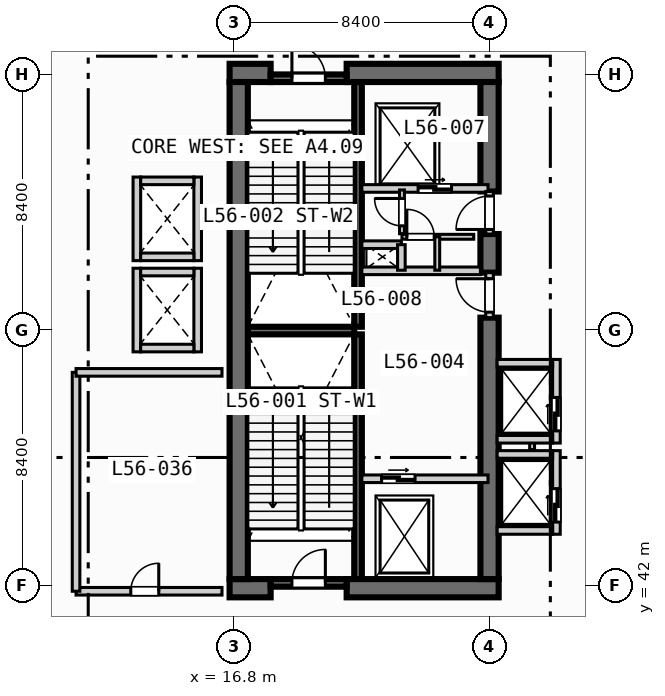
"""IFC4 building model, lengths in metres.
Left out: names, types, materials, properties, quantities, classifications, styles, units other than length and angle.
Written with IfcOpenShell. Run it as: python <this file> out.ifc"""

import sys

from ifc_helpers import new_model, si_unit, direction, frame, frame_2d, origin, place, context, subcontext, project, spatial, rectangle, extrude, element, fill, save


model = new_model("IFC4")
c1 = context("Model", 3, precision=1e-05, world=origin(), true_north=direction((0.0, 1.0)))
c2 = subcontext(c1, "Body", "Model", "MODEL_VIEW")
j1 = project(units=[si_unit("LENGTHUNIT", "METRE"), si_unit("PLANEANGLEUNIT", "RADIAN")], contexts=[c1])
p1 = place(None, origin())
s1 = spatial("IfcSite", under=j1, at=p1, CompositionType="ELEMENT")
p2 = place(p1, origin())
s2 = spatial("IfcBuilding", under=s1, at=p2, CompositionType="ELEMENT")
p3 = place(p2, frame((0.0, 0.0, 228.2)))
s3 = spatial("IfcBuildingStorey", under=s2, at=p3, CompositionType="ELEMENT", Elevation=228.2)
for number, where, z_axis, x_axis in (
    (1, (20.875, 42.2, 0.0), (0.0, 0.0, 1.0), (0.0, 1.0, 0.0)),
    (2, (20.875, 50.5, 0.0), (0.0, 0.0, 1.0), (0.0, 1.0, 0.0)),
):
    element("IfcWall", number, at=place(p3, frame(where, z_axis=z_axis, x_axis=x_axis)), inside=s3, PredefinedType="SOLIDWALL", context=c2, shape_type="SweptSolid", body=[
        extrude(rectangle(XDim=8.05, YDim=0.25, at=frame_2d((4.025, 0.0))), origin(), (0.0, 0.0, 1.0), 5.77),
    ])
p4 = place(p3, frame((17.25, 50.375, 0.0), z_axis=(0.0, 0.0, 1.0), x_axis=(1.0, 0.0, 0.0)))
e3 = element("IfcWall", 3, at=p4, inside=s3, PredefinedType="SOLIDWALL", context=c2, shape_type="SweptSolid", body=[
    extrude(rectangle(XDim=3.5, YDim=0.25, at=frame_2d((1.75, 0.0))), origin(), (0.0, 0.0, 1.0), 5.77),
])
p5 = place(p3, frame((16.65, 41.9, 0.0), z_axis=(0.0, 0.0, 1.0), x_axis=(1.0, 0.0, 0.0)))
e4 = element("IfcWall", 4, at=p5, inside=s3, PredefinedType="SHEAR", context=c2, shape_type="SweptSolid", body=[
    extrude(rectangle(XDim=1.35, YDim=0.6, at=frame_2d((0.675, 0.0))), origin(), (0.0, 0.0, 1.0), 5.77),
])
p6 = place(p3, frame((20.5, 41.9, 0.0), z_axis=(0.0, 0.0, 1.0), x_axis=(1.0, 0.0, 0.0)))
e5 = element("IfcWall", 5, at=p6, inside=s3, PredefinedType="SHEAR", context=c2, shape_type="SweptSolid", body=[
    extrude(rectangle(XDim=5.0, YDim=0.6, at=frame_2d((2.5, 0.0))), origin(), (0.0, 0.0, 1.0), 5.77),
])
p7 = place(p3, frame((16.65, 58.85, 0.0), z_axis=(0.0, 0.0, 1.0), x_axis=(1.0, 0.0, 0.0)))
e6 = element("IfcWall", 6, at=p7, inside=s3, PredefinedType="SHEAR", context=c2, shape_type="SweptSolid", body=[
    extrude(rectangle(XDim=1.35, YDim=0.6, at=frame_2d((0.675, 0.0))), origin(), (0.0, 0.0, 1.0), 5.77),
])
p8 = place(p3, frame((20.5, 58.85, 0.0), z_axis=(0.0, 0.0, 1.0), x_axis=(1.0, 0.0, 0.0)))
e7 = element("IfcWall", 7, at=p8, inside=s3, PredefinedType="SHEAR", context=c2, shape_type="SweptSolid", body=[
    extrude(rectangle(XDim=5.0, YDim=0.6, at=frame_2d((2.5, 0.0))), origin(), (0.0, 0.0, 1.0), 5.77),
])
p9 = place(p3, frame((16.95, 42.2, 0.0), z_axis=(0.0, 0.0, 1.0), x_axis=(0.0, 1.0, 0.0)))
e8 = element("IfcWall", 8, at=p9, inside=s3, PredefinedType="SHEAR", context=c2, shape_type="SweptSolid", body=[
    extrude(rectangle(XDim=16.35, YDim=0.6, at=frame_2d((8.175, 0.0))), origin(), (0.0, 0.0, 1.0), 5.77),
])
p10 = place(p3, frame((25.2, 42.2, 0.0), z_axis=(0.0, 0.0, 1.0), x_axis=(0.0, 1.0, 0.0)))
e9 = element("IfcWall", 9, at=p10, inside=s3, PredefinedType="SHEAR", context=c2, shape_type="SweptSolid", body=[
    extrude(rectangle(XDim=8.6, YDim=0.6, at=frame_2d((4.3, 0.0))), origin(), (0.0, 0.0, 1.0), 5.77),
])
p11 = place(p3, frame((25.2, 52.28, 0.0), z_axis=(0.0, 0.0, 1.0), x_axis=(0.0, 1.0, 0.0)))
e10 = element("IfcWall", 10, at=p11, inside=s3, PredefinedType="SHEAR", context=c2, shape_type="SweptSolid", body=[
    extrude(rectangle(XDim=1.27, YDim=0.6, at=frame_2d((0.635, 0.0))), origin(), (0.0, 0.0, 1.0), 5.77),
])
p12 = place(p3, frame((25.2, 54.95, 0.0), z_axis=(0.0, 0.0, 1.0), x_axis=(0.0, 1.0, 0.0)))
e11 = element("IfcWall", 11, at=p12, inside=s3, PredefinedType="SHEAR", context=c2, shape_type="SweptSolid", body=[
    extrude(rectangle(XDim=3.6, YDim=0.6, at=frame_2d((1.8, 0.0))), origin(), (0.0, 0.0, 1.0), 5.77),
])
p13 = place(p3, frame((18.0, 42.075, 0.0), z_axis=(0.0, 0.0, 1.0), x_axis=(1.0, 0.0, 0.0)))
e12 = element("IfcWall", 12, at=p13, inside=s3, PredefinedType="SOLIDWALL", context=c2, shape_type="SweptSolid", body=[
    extrude(rectangle(XDim=2.5, YDim=0.25, at=frame_2d((1.25, 0.0))), origin(), (0.0, 0.0, 1.0), 5.77),
])
p14 = place(p13, frame((0.7, 0.0, 0.0)))
e13 = element("IfcOpeningElement", 13, at=p14, cuts=e12, PredefinedType="OPENING", context=c2, shape_type="SweptSolid", body=[
    extrude(rectangle(XDim=1.1, YDim=2.15, at=frame_2d((0.55, 1.075))), frame((0.0, 0.135, 0.0), z_axis=(0.0, -1.0, 0.0), x_axis=(1.0, 0.0, 0.0)), (0.0, 0.0, 1.0), 0.27),
])
p15 = place(p3, frame((18.0, 58.675, 0.0), z_axis=(0.0, 0.0, 1.0), x_axis=(1.0, 0.0, 0.0)))
e14 = element("IfcWall", 14, at=p15, inside=s3, PredefinedType="SOLIDWALL", context=c2, shape_type="SweptSolid", body=[
    extrude(rectangle(XDim=2.5, YDim=0.25, at=frame_2d((1.25, 0.0))), origin(), (0.0, 0.0, 1.0), 5.77),
])
p16 = place(p15, frame((0.7, 0.0, 0.0)))
e15 = element("IfcOpeningElement", 15, at=p16, cuts=e14, PredefinedType="OPENING", context=c2, shape_type="SweptSolid", body=[
    extrude(rectangle(XDim=1.1, YDim=2.15, at=frame_2d((0.55, 1.075))), frame((0.0, 0.135, 0.0), z_axis=(0.0, -1.0, 0.0), x_axis=(1.0, 0.0, 0.0)), (0.0, 0.0, 1.0), 0.27),
])
p17 = place(p3, frame((21.0, 45.5, 0.0), z_axis=(0.0, 0.0, 1.0), x_axis=(1.0, 0.0, 0.0)))
e16 = element("IfcWall", 16, at=p17, inside=s3, PredefinedType="SOLIDWALL", context=c2, shape_type="SweptSolid", body=[
    extrude(rectangle(XDim=4.15, YDim=0.25, at=frame_2d((2.075, 0.0))), origin(), (0.0, 0.0, 1.0), 5.77),
])
p18 = place(p17, frame((0.65, 0.0, 0.0)))
e17 = element("IfcOpeningElement", 17, at=p18, cuts=e16, PredefinedType="OPENING", context=c2, shape_type="SweptSolid", body=[
    extrude(rectangle(XDim=1.1, YDim=2.15, at=frame_2d((0.55, 1.075))), frame((0.0, 0.135, 0.0), z_axis=(0.0, -1.0, 0.0), x_axis=(1.0, 0.0, 0.0)), (0.0, 0.0, 1.0), 0.27),
])
p19 = place(p3, frame((25.2, 50.8, 0.0), z_axis=(0.0, 0.0, 1.0), x_axis=(0.0, 1.0, 0.0)))
e18 = element("IfcWall", 18, at=p19, inside=s3, PredefinedType="SOLIDWALL", context=c2, shape_type="SweptSolid", body=[
    extrude(rectangle(XDim=1.48, YDim=0.25, at=frame_2d((0.74, 0.0))), origin(), (0.0, 0.0, 1.0), 5.77),
])
p20 = place(p19, frame((0.18, 0.0, 0.0)))
e19 = element("IfcOpeningElement", 19, at=p20, cuts=e18, PredefinedType="OPENING", context=c2, shape_type="SweptSolid", body=[
    extrude(rectangle(XDim=1.1, YDim=2.15, at=frame_2d((0.55, 1.075))), frame((0.0, 0.135, 0.0), z_axis=(0.0, -1.0, 0.0), x_axis=(1.0, 0.0, 0.0)), (0.0, 0.0, 1.0), 0.27),
])
p21 = place(p3, frame((21.0, 52.34, 0.0), z_axis=(0.0, 0.0, 1.0), x_axis=(1.0, 0.0, 0.0)))
e20 = element("IfcWall", 20, at=p21, inside=s3, PredefinedType="SOLIDWALL", context=c2, shape_type="SweptSolid", body=[
    extrude(rectangle(XDim=3.9, YDim=0.25, at=frame_2d((1.95, 0.0))), origin(), (0.0, 0.0, 1.0), 5.77),
])
p22 = place(p3, frame((21.0, 55.05, 0.0), z_axis=(0.0, 0.0, 1.0), x_axis=(1.0, 0.0, 0.0)))
e21 = element("IfcWall", 21, at=p22, inside=s3, PredefinedType="SOLIDWALL", context=c2, shape_type="SweptSolid", body=[
    extrude(rectangle(XDim=4.15, YDim=0.25, at=frame_2d((2.075, 0.0))), origin(), (0.0, 0.0, 1.0), 5.77),
])
p23 = place(p22, frame((1.85, 0.0, 0.0)))
e22 = element("IfcOpeningElement", 22, at=p23, cuts=e21, PredefinedType="OPENING", context=c2, shape_type="SweptSolid", body=[
    extrude(rectangle(XDim=1.1, YDim=2.15, at=frame_2d((0.55, 1.075))), frame((0.0, 0.135, 0.0), z_axis=(0.0, -1.0, 0.0), x_axis=(1.0, 0.0, 0.0)), (0.0, 0.0, 1.0), 0.27),
])
p24 = place(p3, frame((25.2, 53.55, 0.0), z_axis=(0.0, 0.0, 1.0), x_axis=(0.0, 1.0, 0.0)))
e23 = element("IfcWall", 23, at=p24, inside=s3, PredefinedType="SOLIDWALL", context=c2, shape_type="SweptSolid", body=[
    extrude(rectangle(XDim=1.4, YDim=0.25, at=frame_2d((0.7, 0.0))), origin(), (0.0, 0.0, 1.0), 5.77),
])
p25 = place(p24, frame((0.15, 0.0, 0.0)))
e24 = element("IfcOpeningElement", 24, at=p25, cuts=e23, PredefinedType="OPENING", context=c2, shape_type="SweptSolid", body=[
    extrude(rectangle(XDim=1.1, YDim=2.15, at=frame_2d((0.55, 1.075))), frame((0.0, 0.135, 0.0), z_axis=(0.0, -1.0, 0.0), x_axis=(1.0, 0.0, 0.0)), (0.0, 0.0, 1.0), 0.27),
])
p26 = place(p3, frame((21.0, 53.2, 0.0), z_axis=(0.0, 0.0, 1.0), x_axis=(1.0, 0.0, 0.0)))
e25 = element("IfcWall", 25, at=p26, inside=s3, PredefinedType="SOLIDWALL", context=c2, shape_type="SweptSolid", body=[
    extrude(rectangle(XDim=1.3, YDim=0.25, at=frame_2d((0.65, 0.0))), origin(), (0.0, 0.0, 1.0), 5.77),
])
p27 = place(p3, frame((22.3, 52.36, 0.0), z_axis=(0.0, 0.0, 1.0), x_axis=(0.0, 1.0, 0.0)))
e26 = element("IfcWall", 26, at=p27, inside=s3, PredefinedType="SOLIDWALL", context=c2, shape_type="SweptSolid", body=[
    extrude(rectangle(XDim=0.84, YDim=0.25, at=frame_2d((0.42, 0.0))), origin(), (0.0, 0.0, 1.0), 5.77),
])
p28 = place(p3, frame((22.32, 53.56, 0.0), z_axis=(0.0, 0.0, 1.0), x_axis=(0.0, 1.0, 0.0)))
e27 = element("IfcWall", 27, at=p28, inside=s3, PredefinedType="PARTITIONING", context=c2, shape_type="SweptSolid", body=[
    extrude(rectangle(XDim=1.44, YDim=0.16, at=frame_2d((0.72, 0.0))), origin(), (0.0, 0.0, 1.0), 5.77),
])
p29 = place(p28, frame((0.26, 0.0, 0.0)))
e28 = element("IfcOpeningElement", 28, at=p29, cuts=e27, PredefinedType="OPENING", context=c2, shape_type="SweptSolid", body=[
    extrude(rectangle(XDim=0.9, YDim=2.1, at=frame_2d((0.45, 1.05))), frame((0.0, 0.09, 0.0), z_axis=(0.0, -1.0, 0.0), x_axis=(1.0, 0.0, 0.0)), (0.0, 0.0, 1.0), 0.18),
])
p30 = place(p3, frame((22.32, 53.46, 0.0), z_axis=(0.0, 0.0, 1.0), x_axis=(1.0, 0.0, 0.0)))
e29 = element("IfcWall", 29, at=p30, inside=s3, PredefinedType="PARTITIONING", context=c2, shape_type="SweptSolid", body=[
    extrude(rectangle(XDim=2.36, YDim=0.16, at=frame_2d((1.18, 0.0))), origin(), (0.0, 0.0, 1.0), 5.77),
])
p31 = place(p30, frame((0.16, 0.0, 0.0)))
e30 = element("IfcOpeningElement", 30, at=p31, cuts=e29, PredefinedType="OPENING", context=c2, shape_type="SweptSolid", body=[
    extrude(rectangle(XDim=0.9, YDim=2.1, at=frame_2d((0.45, 1.05))), frame((0.0, 0.09, 0.0), z_axis=(0.0, -1.0, 0.0), x_axis=(1.0, 0.0, 0.0)), (0.0, 0.0, 1.0), 0.18),
])
p32 = place(p3, frame((23.48, 52.36, 0.0), z_axis=(0.0, 0.0, 1.0), x_axis=(0.0, 1.0, 0.0)))
e31 = element("IfcWall", 31, at=p32, inside=s3, PredefinedType="PARTITIONING", context=c2, shape_type="SweptSolid", body=[
    extrude(rectangle(XDim=1.1, YDim=0.16, at=frame_2d((0.55, 0.0))), origin(), (0.0, 0.0, 1.0), 5.77),
])
for number, where, z_axis, x_axis in (
    (32, (13.6, 49.675, 0.0), (0.0, 0.0, 1.0), (0.0, 1.0, 0.0)),
    (33, (15.6, 49.675, 0.0), (0.0, 0.0, 1.0), (0.0, 1.0, 0.0)),
):
    element("IfcWall", number, at=place(p3, frame(where, z_axis=z_axis, x_axis=x_axis)), inside=s3, PredefinedType="SOLIDWALL", context=c2, shape_type="SweptSolid", body=[
        extrude(rectangle(XDim=2.75, YDim=0.25, at=frame_2d((1.375, 0.0))), origin(), (0.0, 0.0, 1.0), 5.77),
    ])
for number, where, z_axis, x_axis in (
    (34, (13.725, 49.8, 0.0), (0.0, 0.0, 1.0), (1.0, 0.0, 0.0)),
    (35, (13.725, 52.3, 0.0), (0.0, 0.0, 1.0), (1.0, 0.0, 0.0)),
):
    element("IfcWall", number, at=place(p3, frame(where, z_axis=z_axis, x_axis=x_axis)), inside=s3, PredefinedType="SOLIDWALL", context=c2, shape_type="SweptSolid", body=[
        extrude(rectangle(XDim=1.75, YDim=0.25, at=frame_2d((0.875, 0.0))), origin(), (0.0, 0.0, 1.0), 5.77),
    ])
for number, where, z_axis, x_axis in (
    (36, (13.6, 52.675, 0.0), (0.0, 0.0, 1.0), (0.0, 1.0, 0.0)),
    (37, (15.6, 52.675, 0.0), (0.0, 0.0, 1.0), (0.0, 1.0, 0.0)),
):
    element("IfcWall", number, at=place(p3, frame(where, z_axis=z_axis, x_axis=x_axis)), inside=s3, PredefinedType="SOLIDWALL", context=c2, shape_type="SweptSolid", body=[
        extrude(rectangle(XDim=2.75, YDim=0.25, at=frame_2d((1.375, 0.0))), origin(), (0.0, 0.0, 1.0), 5.77),
    ])
for number, where, z_axis, x_axis in (
    (38, (13.725, 52.8, 0.0), (0.0, 0.0, 1.0), (1.0, 0.0, 0.0)),
    (39, (13.725, 55.3, 0.0), (0.0, 0.0, 1.0), (1.0, 0.0, 0.0)),
):
    element("IfcWall", number, at=place(p3, frame(where, z_axis=z_axis, x_axis=x_axis)), inside=s3, PredefinedType="SOLIDWALL", context=c2, shape_type="SweptSolid", body=[
        extrude(rectangle(XDim=1.75, YDim=0.25, at=frame_2d((0.875, 0.0))), origin(), (0.0, 0.0, 1.0), 5.77),
    ])
p33 = place(p3, frame((27.4, 43.675, 0.0), z_axis=(0.0, 0.0, 1.0), x_axis=(0.0, 1.0, 0.0)))
e40 = element("IfcWall", 40, at=p33, inside=s3, PredefinedType="SOLIDWALL", context=c2, shape_type="SweptSolid", body=[
    extrude(rectangle(XDim=2.75, YDim=0.25, at=frame_2d((1.375, 0.0))), origin(), (0.0, 0.0, 1.0), 5.77),
])
p34 = place(p33, frame((0.4, 0.0, 0.0)))
e41 = element("IfcOpeningElement", 41, at=p34, cuts=e40, PredefinedType="OPENING", context=c2, shape_type="SweptSolid", body=[
    extrude(rectangle(XDim=1.1, YDim=2.15, at=frame_2d((0.55, 1.075))), frame((0.0, 0.135, 0.0), z_axis=(0.0, -1.0, 0.0), x_axis=(1.0, 0.0, 0.0)), (0.0, 0.0, 1.0), 0.27),
])
for number, where, z_axis, x_axis in (
    (42, (25.45, 43.8, 0.0), (0.0, 0.0, 1.0), (1.0, 0.0, 0.0)),
    (43, (25.45, 46.3, 0.0), (0.0, 0.0, 1.0), (1.0, 0.0, 0.0)),
):
    element("IfcWall", number, at=place(p3, frame(where, z_axis=z_axis, x_axis=x_axis)), inside=s3, PredefinedType="SOLIDWALL", context=c2, shape_type="SweptSolid", body=[
        extrude(rectangle(XDim=1.825, YDim=0.25, at=frame_2d((0.913, 0.0))), origin(), (0.0, 0.0, 1.0), 5.77),
    ])
p35 = place(p3, frame((26.6, 46.46, 0.0), z_axis=(0.0, 0.0, 1.0), x_axis=(0.0, 1.0, 0.0)))
e44 = element("IfcWall", 44, at=p35, inside=s3, PredefinedType="PARTITIONING", context=c2, shape_type="SweptSolid", body=[
    extrude(rectangle(XDim=0.88, YDim=0.16, at=frame_2d((0.44, 0.0))), origin(), (0.0, 0.0, 1.0), 5.77),
])
p36 = place(p3, frame((27.4, 46.675, 0.0), z_axis=(0.0, 0.0, 1.0), x_axis=(0.0, 1.0, 0.0)))
e45 = element("IfcWall", 45, at=p36, inside=s3, PredefinedType="SOLIDWALL", context=c2, shape_type="SweptSolid", body=[
    extrude(rectangle(XDim=2.75, YDim=0.25, at=frame_2d((1.375, 0.0))), origin(), (0.0, 0.0, 1.0), 5.77),
])
p37 = place(p36, frame((0.4, 0.0, 0.0)))
e46 = element("IfcOpeningElement", 46, at=p37, cuts=e45, PredefinedType="OPENING", context=c2, shape_type="SweptSolid", body=[
    extrude(rectangle(XDim=1.1, YDim=2.15, at=frame_2d((0.55, 1.075))), frame((0.0, 0.135, 0.0), z_axis=(0.0, -1.0, 0.0), x_axis=(1.0, 0.0, 0.0)), (0.0, 0.0, 1.0), 0.27),
])
for number, where, z_axis, x_axis in (
    (47, (25.45, 46.8, 0.0), (0.0, 0.0, 1.0), (1.0, 0.0, 0.0)),
    (48, (25.45, 49.3, 0.0), (0.0, 0.0, 1.0), (1.0, 0.0, 0.0)),
):
    element("IfcWall", number, at=place(p3, frame(where, z_axis=z_axis, x_axis=x_axis)), inside=s3, PredefinedType="SOLIDWALL", context=c2, shape_type="SweptSolid", body=[
        extrude(rectangle(XDim=1.825, YDim=0.25, at=frame_2d((0.913, 0.0))), origin(), (0.0, 0.0, 1.0), 5.77),
    ])
p38 = place(p3, frame((11.6, 41.8, 0.0), z_axis=(0.0, 0.0, 1.0), x_axis=(1.0, 0.0, 0.0)))
e49 = element("IfcWall", 49, at=p38, inside=s3, PredefinedType="SOLIDWALL", context=c2, shape_type="SweptSolid", body=[
    extrude(rectangle(XDim=4.8, YDim=0.25, at=frame_2d((2.4, 0.0))), origin(), (0.0, 0.0, 1.0), 5.12),
])
p39 = place(p38, frame((1.8, 0.0, 0.0)))
e50 = element("IfcOpeningElement", 50, at=p39, cuts=e49, PredefinedType="OPENING", context=c2, shape_type="SweptSolid", body=[
    extrude(rectangle(XDim=0.92, YDim=2.1, at=frame_2d((0.46, 1.05))), frame((0.0, 0.135, 0.0), z_axis=(0.0, -1.0, 0.0), x_axis=(1.0, 0.0, 0.0)), (0.0, 0.0, 1.0), 0.27),
])
p40 = place(p3, frame((11.6, 41.8, 0.0), z_axis=(0.0, 0.0, 1.0), x_axis=(0.0, 1.0, 0.0)))
e51 = element("IfcWall", 51, at=p40, inside=s3, PredefinedType="SOLIDWALL", context=c2, shape_type="SweptSolid", body=[
    extrude(rectangle(XDim=7.2, YDim=0.25, at=frame_2d((3.6, 0.0))), origin(), (0.0, 0.0, 1.0), 5.77),
])
p41 = place(p3, frame((11.6, 49.0, 0.0), z_axis=(0.0, 0.0, 1.0), x_axis=(1.0, 0.0, 0.0)))
e52 = element("IfcWall", 52, at=p41, inside=s3, PredefinedType="SOLIDWALL", context=c2, shape_type="SweptSolid", body=[
    extrude(rectangle(XDim=4.8, YDim=0.25, at=frame_2d((2.4, 0.0))), origin(), (0.0, 0.0, 1.0), 5.77),
])
p42 = place(p14, origin())
e53 = element("IfcDoor", 53, at=p42, inside=s3, OperationType="SINGLE_SWING_RIGHT", PredefinedType="DOOR", context=c2, shape_type="SweptSolid", body=[
    extrude(rectangle(XDim=1.1, YDim=2.15, at=frame_2d((0.55, 1.075))), frame((0.0, 0.025, 0.0), z_axis=(0.0, -1.0, 0.0), x_axis=(1.0, 0.0, 0.0)), (0.0, 0.0, 1.0), 0.05),
])
fill(e13, e53)
p43 = place(p16, origin())
e54 = element("IfcDoor", 54, at=p43, inside=s3, OperationType="SINGLE_SWING_LEFT", PredefinedType="DOOR", context=c2, shape_type="SweptSolid", body=[
    extrude(rectangle(XDim=1.1, YDim=2.15, at=frame_2d((0.55, 1.075))), frame((0.0, 0.025, 0.0), z_axis=(0.0, -1.0, 0.0), x_axis=(1.0, 0.0, 0.0)), (0.0, 0.0, 1.0), 0.05),
])
fill(e15, e54)
p44 = place(p18, origin())
e55 = element("IfcDoor", 55, at=p44, inside=s3, OperationType="SLIDING_TO_LEFT", PredefinedType="DOOR", context=c2, shape_type="SweptSolid", body=[
    extrude(rectangle(XDim=1.1, YDim=2.15, at=frame_2d((0.55, 1.075))), frame((0.0, 0.025, 0.0), z_axis=(0.0, -1.0, 0.0), x_axis=(1.0, 0.0, 0.0)), (0.0, 0.0, 1.0), 0.05),
])
fill(e17, e55)
p45 = place(p20, origin())
e56 = element("IfcDoor", 56, at=p45, inside=s3, OperationType="SINGLE_SWING_RIGHT", PredefinedType="DOOR", context=c2, shape_type="SweptSolid", body=[
    extrude(rectangle(XDim=1.1, YDim=2.15, at=frame_2d((0.55, 1.075))), frame((0.0, 0.025, 0.0), z_axis=(0.0, -1.0, 0.0), x_axis=(1.0, 0.0, 0.0)), (0.0, 0.0, 1.0), 0.05),
])
fill(e19, e56)
p46 = place(p23, origin())
e57 = element("IfcDoor", 57, at=p46, inside=s3, OperationType="SLIDING_TO_LEFT", PredefinedType="DOOR", context=c2, shape_type="SweptSolid", body=[
    extrude(rectangle(XDim=1.1, YDim=2.15, at=frame_2d((0.55, 1.075))), frame((0.0, 0.025, 0.0), z_axis=(0.0, -1.0, 0.0), x_axis=(1.0, 0.0, 0.0)), (0.0, 0.0, 1.0), 0.05),
])
fill(e22, e57)
p47 = place(p25, origin())
e58 = element("IfcDoor", 58, at=p47, inside=s3, OperationType="SINGLE_SWING_LEFT", PredefinedType="DOOR", context=c2, shape_type="SweptSolid", body=[
    extrude(rectangle(XDim=1.1, YDim=2.15, at=frame_2d((0.55, 1.075))), frame((0.0, 0.025, 0.0), z_axis=(0.0, -1.0, 0.0), x_axis=(1.0, 0.0, 0.0)), (0.0, 0.0, 1.0), 0.05),
])
fill(e24, e58)
p48 = place(p29, origin())
e59 = element("IfcDoor", 59, at=p48, inside=s3, OperationType="SINGLE_SWING_RIGHT", PredefinedType="DOOR", context=c2, shape_type="SweptSolid", body=[
    extrude(rectangle(XDim=0.9, YDim=2.1, at=frame_2d((0.45, 1.05))), frame((0.0, 0.025, 0.0), z_axis=(0.0, -1.0, 0.0), x_axis=(1.0, 0.0, 0.0)), (0.0, 0.0, 1.0), 0.05),
])
fill(e28, e59)
p49 = place(p31, origin())
e60 = element("IfcDoor", 60, at=p49, inside=s3, OperationType="SINGLE_SWING_LEFT", PredefinedType="DOOR", context=c2, shape_type="SweptSolid", body=[
    extrude(rectangle(XDim=0.9, YDim=2.1, at=frame_2d((0.45, 1.05))), frame((0.0, 0.025, 0.0), z_axis=(0.0, -1.0, 0.0), x_axis=(1.0, 0.0, 0.0)), (0.0, 0.0, 1.0), 0.05),
])
fill(e30, e60)
p50 = place(p34, origin())
e61 = element("IfcDoor", 61, at=p50, inside=s3, OperationType="SLIDING_TO_LEFT", PredefinedType="DOOR", context=c2, shape_type="SweptSolid", body=[
    extrude(rectangle(XDim=1.1, YDim=2.15, at=frame_2d((0.55, 1.075))), frame((0.0, 0.025, 0.0), z_axis=(0.0, -1.0, 0.0), x_axis=(1.0, 0.0, 0.0)), (0.0, 0.0, 1.0), 0.05),
])
fill(e41, e61)
p51 = place(p37, origin())
e62 = element("IfcDoor", 62, at=p51, inside=s3, OperationType="SLIDING_TO_LEFT", PredefinedType="DOOR", context=c2, shape_type="SweptSolid", body=[
    extrude(rectangle(XDim=1.1, YDim=2.15, at=frame_2d((0.55, 1.075))), frame((0.0, 0.025, 0.0), z_axis=(0.0, -1.0, 0.0), x_axis=(1.0, 0.0, 0.0)), (0.0, 0.0, 1.0), 0.05),
])
fill(e46, e62)
p52 = place(p39, origin())
e63 = element("IfcDoor", 63, at=p52, inside=s3, OperationType="SINGLE_SWING_RIGHT", PredefinedType="DOOR", context=c2, shape_type="SweptSolid", body=[
    extrude(rectangle(XDim=0.92, YDim=2.1, at=frame_2d((0.46, 1.05))), frame((0.0, 0.025, 0.0), z_axis=(0.0, -1.0, 0.0), x_axis=(1.0, 0.0, 0.0)), (0.0, 0.0, 1.0), 0.05),
])
fill(e50, e63)
save(model, sys.argv[1])
